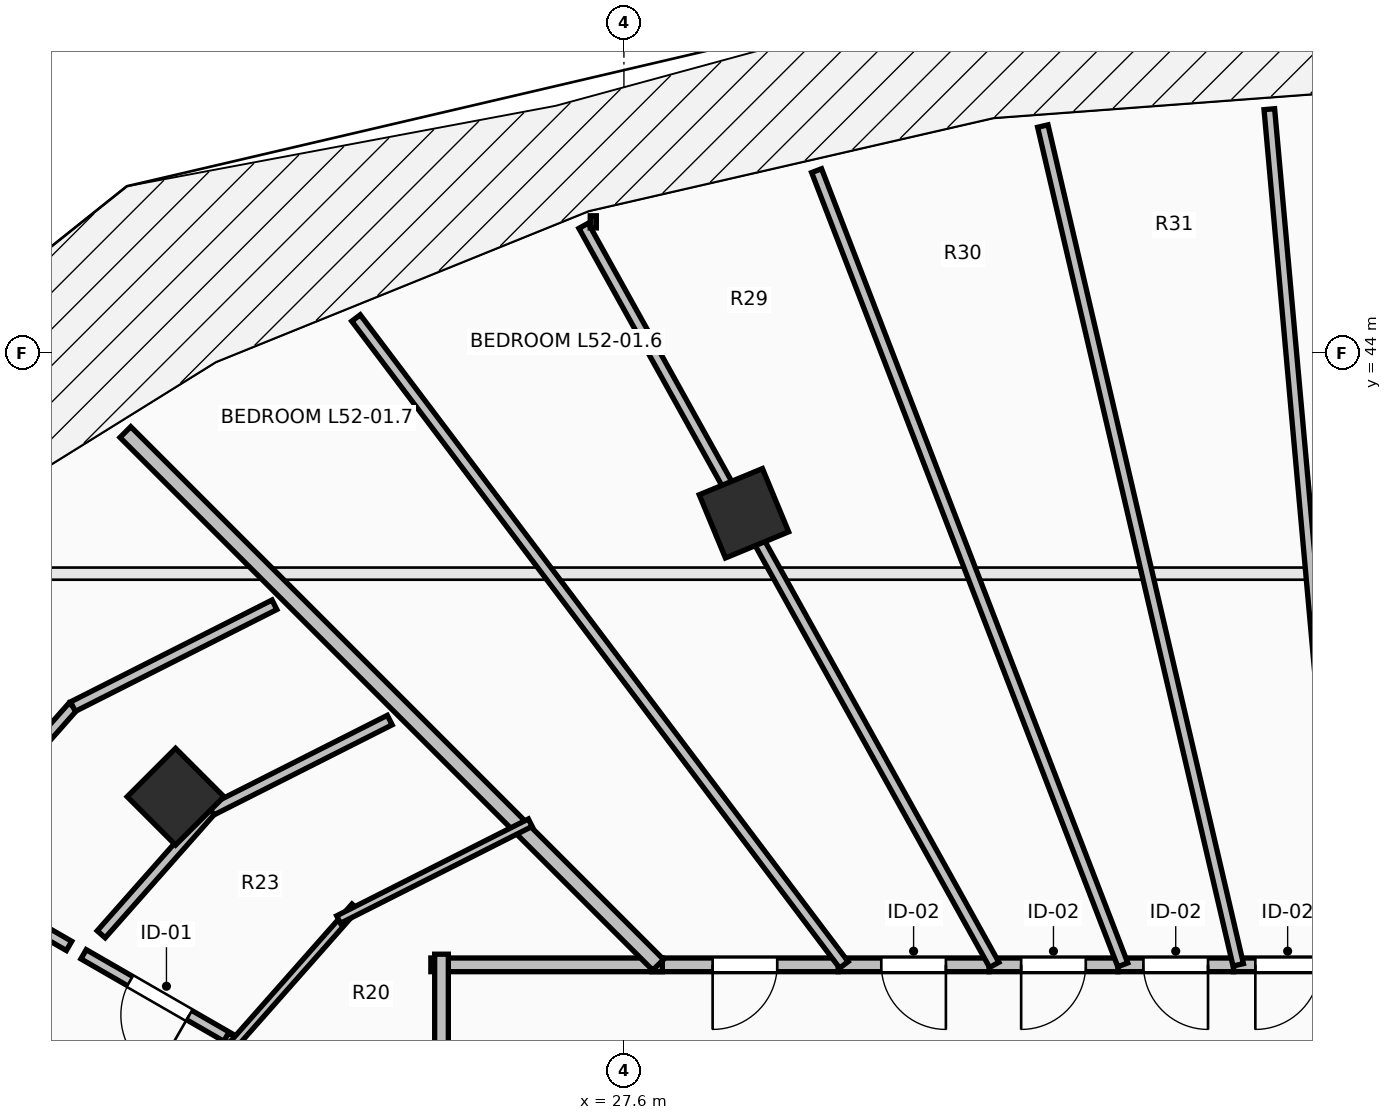
"""IFC4 building model, lengths in metres.
Left out: names, types, materials, properties, quantities, classifications, styles, units other than length and angle.
Written with IfcOpenShell. Run it as: python <this file> out.ifc"""

import sys

from ifc_helpers import new_model, si_unit, direction, frame, frame_2d, origin, origin_2d, place, context, subcontext, project, spatial, rectangle, extrude, element, fill, save


model = new_model("IFC4")
c1 = context("Model", 3, precision=1e-05, world=origin(), true_north=direction((0.0, 1.0)))
c2 = subcontext(c1, "Body", "Model", "MODEL_VIEW")
j1 = project(units=[si_unit("LENGTHUNIT", "METRE"), si_unit("PLANEANGLEUNIT", "RADIAN")], contexts=[c1])
p1 = place(None, origin())
s1 = spatial("IfcSite", under=j1, at=p1, CompositionType="ELEMENT")
p2 = place(p1, origin())
s2 = spatial("IfcBuilding", under=s1, at=p2, CompositionType="ELEMENT")
p3 = place(p2, frame((0.0, 0.0, 193.1)))
s3 = spatial("IfcBuildingStorey", under=s2, at=p3, CompositionType="ELEMENT", Elevation=193.1)
for number, where, z_axis, x_axis in (
    (1, (29.179, 41.891, 0.0), (0.0, 0.0, 1.0), (-0.383, 0.924, 0.0)),
    (2, (21.701, 38.162, 0.0), (0.0, 0.0, 1.0), (-0.707, 0.707, 0.0)),
):
    element("IfcColumn", number, at=place(p3, frame(where, z_axis=z_axis, x_axis=x_axis)), inside=s3, PredefinedType="COLUMN", context=c2, shape_type="SweptSolid", body=[
        extrude(rectangle(XDim=0.9, YDim=0.9, at=origin_2d()), origin(), (0.0, 0.0, 1.0), 3.5),
    ])
p4 = place(p3, frame((37.044, 35.95, 0.0), z_axis=(0.0, 0.0, 1.0), x_axis=(-1.0, 0.0, 0.0)))
e3 = element("IfcWall", 3, at=p4, inside=s3, PredefinedType="PARTITIONING", context=c2, shape_type="SweptSolid", body=[
    extrude(rectangle(XDim=1.424, YDim=0.18, at=frame_2d((0.712, 0.0))), origin(), (0.0, 0.0, 1.0), 3.24),
])
p5 = place(p4, frame((0.287, 0.0, 0.0)))
e4 = element("IfcOpeningElement", 4, at=p5, cuts=e3, PredefinedType="OPENING", context=c2, shape_type="SweptSolid", body=[
    extrude(rectangle(XDim=0.85, YDim=2.1, at=frame_2d((0.425, 1.05))), frame((0.0, 0.105, 0.0), z_axis=(0.0, -1.0, 0.0), x_axis=(1.0, 0.0, 0.0)), (0.0, 0.0, 1.0), 0.21),
])
p6 = place(p3, frame((35.62, 35.95, 0.0), z_axis=(0.0, 0.0, 1.0), x_axis=(-1.0, 0.0, 0.0)))
e5 = element("IfcWall", 5, at=p6, inside=s3, PredefinedType="PARTITIONING", context=c2, shape_type="SweptSolid", body=[
    extrude(rectangle(XDim=1.521, YDim=0.18, at=frame_2d((0.76, 0.0))), origin(), (0.0, 0.0, 1.0), 3.24),
])
p7 = place(p6, frame((0.335, 0.0, 0.0)))
e6 = element("IfcOpeningElement", 6, at=p7, cuts=e5, PredefinedType="OPENING", context=c2, shape_type="SweptSolid", body=[
    extrude(rectangle(XDim=0.85, YDim=2.1, at=frame_2d((0.425, 1.05))), frame((0.0, 0.105, 0.0), z_axis=(0.0, -1.0, 0.0), x_axis=(1.0, 0.0, 0.0)), (0.0, 0.0, 1.0), 0.21),
])
p8 = place(p3, frame((34.099, 35.95, 0.0), z_axis=(0.0, 0.0, 1.0), x_axis=(-1.0, 0.0, 0.0)))
e7 = element("IfcWall", 7, at=p8, inside=s3, PredefinedType="PARTITIONING", context=c2, shape_type="SweptSolid", body=[
    extrude(rectangle(XDim=1.696, YDim=0.18, at=frame_2d((0.848, 0.0))), origin(), (0.0, 0.0, 1.0), 3.24),
])
p9 = place(p8, frame((0.423, 0.0, 0.0)))
e8 = element("IfcOpeningElement", 8, at=p9, cuts=e7, PredefinedType="OPENING", context=c2, shape_type="SweptSolid", body=[
    extrude(rectangle(XDim=0.85, YDim=2.1, at=frame_2d((0.425, 1.05))), frame((0.0, 0.105, 0.0), z_axis=(0.0, -1.0, 0.0), x_axis=(1.0, 0.0, 0.0)), (0.0, 0.0, 1.0), 0.21),
])
p10 = place(p3, frame((32.403, 35.95, 0.0), z_axis=(0.0, 0.0, 1.0), x_axis=(-1.0, 0.0, 0.0)))
e9 = element("IfcWall", 9, at=p10, inside=s3, PredefinedType="PARTITIONING", context=c2, shape_type="SweptSolid", body=[
    extrude(rectangle(XDim=1.984, YDim=0.18, at=frame_2d((0.992, 0.0))), origin(), (0.0, 0.0, 1.0), 2.432),
])
p11 = place(p10, frame((0.567, 0.0, 0.0)))
e10 = element("IfcOpeningElement", 10, at=p11, cuts=e9, PredefinedType="OPENING", context=c2, shape_type="SweptSolid", body=[
    extrude(rectangle(XDim=0.85, YDim=2.1, at=frame_2d((0.425, 1.05))), frame((0.0, 0.105, 0.0), z_axis=(0.0, -1.0, 0.0), x_axis=(1.0, 0.0, 0.0)), (0.0, 0.0, 1.0), 0.21),
])
p12 = place(p3, frame((30.419, 35.95, 0.0), z_axis=(0.0, 0.0, 1.0), x_axis=(-1.0, 0.0, 0.0)))
e11 = element("IfcWall", 11, at=p12, inside=s3, PredefinedType="PARTITIONING", context=c2, shape_type="SweptSolid", body=[
    extrude(rectangle(XDim=2.454, YDim=0.18, at=frame_2d((1.227, 0.0))), origin(), (0.0, 0.0, 1.0), 2.432),
])
p13 = place(p12, frame((0.802, 0.0, 0.0)))
e12 = element("IfcOpeningElement", 12, at=p13, cuts=e11, PredefinedType="OPENING", context=c2, shape_type="SweptSolid", body=[
    extrude(rectangle(XDim=0.85, YDim=2.1, at=frame_2d((0.425, 1.05))), frame((0.0, 0.105, 0.0), z_axis=(0.0, -1.0, 0.0), x_axis=(1.0, 0.0, 0.0)), (0.0, 0.0, 1.0), 0.21),
])
p14 = place(p3, frame((28.105, 35.95, 0.0), z_axis=(0.0, 0.0, 1.0), x_axis=(-1.0, 0.0, 0.0)))
e13 = element("IfcWall", 13, at=p14, inside=s3, PredefinedType="PARTITIONING", context=c2, shape_type="SweptSolid", body=[
    extrude(rectangle(XDim=3.045, YDim=0.18, at=frame_2d((1.522, 0.0))), origin(), (0.0, 0.0, 1.0), 2.432),
])
p15 = place(p3, frame((25.2, 36.09, 0.0), z_axis=(0.0, 0.0, 1.0), x_axis=(0.0, -1.0, 0.0)))
e14 = element("IfcWall", 14, at=p15, inside=s3, PredefinedType="PARTITIONING", context=c2, shape_type="SweptSolid", body=[
    extrude(rectangle(XDim=2.785, YDim=0.18, at=frame_2d((1.393, 0.0))), origin(), (0.0, 0.0, 1.0), 2.432),
])
p16 = place(p3, frame((36.091, 47.207, 0.0), z_axis=(0.0, 0.0, 1.0), x_axis=(0.089620343685, -0.995976000714, 0.0)))
e15 = element("IfcWall", 15, at=p16, inside=s3, PredefinedType="PARTITIONING", context=c2, shape_type="SweptSolid", body=[
    extrude(rectangle(XDim=11.302, YDim=0.14, at=frame_2d((5.651, 0.0))), origin(), (0.0, 0.0, 1.0), 2.432),
])
p17 = place(p3, frame((33.111, 46.985, 0.0), z_axis=(0.0, 0.0, 1.0), x_axis=(0.226889028745, -0.973920617214, 0.0)))
e16 = element("IfcWall", 16, at=p17, inside=s3, PredefinedType="PARTITIONING", context=c2, shape_type="SweptSolid", body=[
    extrude(rectangle(XDim=11.331, YDim=0.14, at=frame_2d((5.665, 0.0))), origin(), (0.0, 0.0, 1.0), 2.432),
])
p18 = place(p3, frame((30.135, 46.398, 0.0), z_axis=(0.0, 0.0, 1.0), x_axis=(0.359727007777, -0.933057597298, 0.0)))
e17 = element("IfcWall", 17, at=p18, inside=s3, PredefinedType="PARTITIONING", context=c2, shape_type="SweptSolid", body=[
    extrude(rectangle(XDim=11.198, YDim=0.14, at=frame_2d((5.599, 0.0))), origin(), (0.0, 0.0, 1.0), 2.432),
])
p19 = place(p3, frame((27.069, 45.673, 0.0), z_axis=(0.0, 0.0, 1.0), x_axis=(0.485717471054, -0.874115860921, 0.0)))
e18 = element("IfcWall", 18, at=p19, inside=s3, PredefinedType="PARTITIONING", context=c2, shape_type="SweptSolid", body=[
    extrude(rectangle(XDim=11.123, YDim=0.14, at=frame_2d((5.562, 0.0))), origin(), (0.0, 0.0, 1.0), 2.432),
])
p20 = place(p3, frame((24.075, 44.46, 0.0), z_axis=(0.0, 0.0, 1.0), x_axis=(0.602185523072, -0.798356183544, 0.0)))
e19 = element("IfcWall", 19, at=p20, inside=s3, PredefinedType="PARTITIONING", context=c2, shape_type="SweptSolid", body=[
    extrude(rectangle(XDim=10.659, YDim=0.14, at=frame_2d((5.33, 0.0))), origin(), (0.0, 0.0, 1.0), 2.432),
])
p21 = place(p3, frame((21.041, 42.959, 0.0), z_axis=(0.0, 0.0, 1.0), x_axis=(0.707106781187, -0.707106781187, 0.0)))
e20 = element("IfcWall", 20, at=p21, inside=s3, PredefinedType="PARTITIONING", context=c2, shape_type="SweptSolid", body=[
    extrude(rectangle(XDim=9.912, YDim=0.2, at=frame_2d((4.956, 0.0))), origin(), (0.0, 0.0, 1.0), 2.432),
])
p22 = place(p3, frame((22.492, 34.936, 0.0), z_axis=(0.0, 0.0, 1.0), x_axis=(-0.866435390844, 0.499289208267, 0.0)))
e21 = element("IfcWall", 21, at=p22, inside=s3, PredefinedType="PARTITIONING", context=c2, shape_type="SweptSolid", body=[
    extrude(rectangle(XDim=2.309, YDim=0.14, at=frame_2d((1.155, 0.0))), origin(), (0.0, 0.0, 1.0), 2.922),
])
p23 = place(p22, frame((0.705, 0.0, 0.0)))
e22 = element("IfcOpeningElement", 22, at=p23, cuts=e21, PredefinedType="OPENING", context=c2, shape_type="SweptSolid", body=[
    extrude(rectangle(XDim=0.9, YDim=2.1, at=frame_2d((0.45, 1.05))), frame((0.0, 0.085, 0.0), z_axis=(0.0, -1.0, 0.0), x_axis=(1.0, 0.0, 0.0)), (0.0, 0.0, 1.0), 0.17),
])
p24 = place(p3, frame((25.321, 33.306, 0.0), z_axis=(0.0, 0.0, 1.0), x_axis=(-0.866517217622, 0.49914718427, 0.0)))
e23 = element("IfcWall", 23, at=p24, inside=s3, PredefinedType="PARTITIONING", context=c2, shape_type="SweptSolid", body=[
    extrude(rectangle(XDim=3.405, YDim=0.11, at=frame_2d((1.703, 0.0))), origin(), (0.0, 0.0, 1.0), 2.922),
])
p25 = place(p24, frame((1.278, 0.0, 0.0)))
e24 = element("IfcOpeningElement", 24, at=p25, cuts=e23, PredefinedType="OPENING", context=c2, shape_type="SweptSolid", body=[
    extrude(rectangle(XDim=0.85, YDim=2.1, at=frame_2d((0.425, 1.05))), frame((0.0, 0.07, 0.0), z_axis=(0.0, -1.0, 0.0), x_axis=(1.0, 0.0, 0.0)), (0.0, 0.0, 1.0), 0.14),
])
p26 = place(p3, frame((22.399, 34.831, 0.0), z_axis=(0.0, 0.0, 1.0), x_axis=(0.662292938072, 0.749244996099, 0.0)))
e25 = element("IfcWall", 25, at=p26, inside=s3, PredefinedType="PARTITIONING", context=c2, shape_type="SweptSolid", body=[
    extrude(rectangle(XDim=2.513, YDim=0.11, at=frame_2d((1.256, 0.0))), origin(), (0.0, 0.0, 1.0), 2.432),
])
p27 = place(p3, frame((23.846, 36.546, 0.0), z_axis=(0.0, 0.0, 1.0), x_axis=(0.892553076465, 0.450942352959, 0.0)))
e26 = element("IfcWall", 26, at=p27, inside=s3, PredefinedType="PARTITIONING", context=c2, shape_type="SweptSolid", body=[
    extrude(rectangle(XDim=2.826, YDim=0.11, at=frame_2d((1.413, 0.0))), origin(), (0.0, 0.0, 1.0), 2.432),
])
p28 = place(p3, frame((18.49, 37.242, 0.0), z_axis=(0.0, 0.0, 1.0), x_axis=(0.662371376331, 0.749175653513, 0.0)))
e27 = element("IfcWall", 27, at=p28, inside=s3, PredefinedType="PARTITIONING", context=c2, shape_type="SweptSolid", body=[
    extrude(rectangle(XDim=2.81, YDim=0.14, at=frame_2d((1.405, 0.0))), origin(), (0.0, 0.0, 1.0), 3.24),
])
p29 = place(p3, frame((20.351, 39.347, 0.0), z_axis=(0.0, 0.0, 1.0), x_axis=(0.89244587056, 0.451154483653, 0.0)))
e28 = element("IfcWall", 28, at=p29, inside=s3, PredefinedType="PARTITIONING", context=c2, shape_type="SweptSolid", body=[
    extrude(rectangle(XDim=2.97, YDim=0.14, at=frame_2d((1.485, 0.0))), origin(), (0.0, 0.0, 1.0), 3.24),
])
p30 = place(p3, frame((20.3, 36.199, 0.0), z_axis=(0.0, 0.0, 1.0), x_axis=(-0.86645395742, 0.499256987604, 0.0)))
e29 = element("IfcWall", 29, at=p30, inside=s3, PredefinedType="PARTITIONING", context=c2, shape_type="SweptSolid", body=[
    extrude(rectangle(XDim=2.089, YDim=0.14, at=frame_2d((1.044, 0.0))), origin(), (0.0, 0.0, 1.0), 2.774),
])
p31 = place(p3, frame((24.519, 39.17, 0.0), z_axis=(0.0, 0.0, 1.0), x_axis=(-0.89247840077, -0.451090128643, 0.0)))
e30 = element("IfcWall", 30, at=p31, inside=s3, PredefinedType="PARTITIONING", context=c2, shape_type="SweptSolid", body=[
    extrude(rectangle(XDim=2.642, YDim=0.14, at=frame_2d((1.321, 0.0))), origin(), (0.0, 0.0, 1.0), 2.432),
])
p32 = place(p3, frame((22.161, 37.978, 0.0), z_axis=(0.0, 0.0, 1.0), x_axis=(-0.662476802918, -0.749082429106, 0.0)))
e31 = element("IfcWall", 31, at=p32, inside=s3, PredefinedType="PARTITIONING", context=c2, shape_type="SweptSolid", body=[
    extrude(rectangle(XDim=2.171, YDim=0.14, at=frame_2d((1.085, 0.0))), origin(), (0.0, 0.0, 1.0), 2.432),
])
p33 = place(p23, origin())
e32 = element("IfcDoor", 32, at=p33, inside=s3, OperationType="SINGLE_SWING_LEFT", PredefinedType="DOOR", context=c2, shape_type="SweptSolid", body=[
    extrude(rectangle(XDim=0.9, YDim=2.1, at=frame_2d((0.45, 1.05))), frame((0.0, 0.025, 0.0), z_axis=(0.0, -1.0, 0.0), x_axis=(1.0, 0.0, 0.0)), (0.0, 0.0, 1.0), 0.05),
])
fill(e22, e32)
p34 = place(p5, origin())
e33 = element("IfcDoor", 33, at=p34, inside=s3, OperationType="SINGLE_SWING_RIGHT", PredefinedType="DOOR", context=c2, shape_type="SweptSolid", body=[
    extrude(rectangle(XDim=0.85, YDim=2.1, at=frame_2d((0.425, 1.05))), frame((0.0, 0.025, 0.0), z_axis=(0.0, -1.0, 0.0), x_axis=(1.0, 0.0, 0.0)), (0.0, 0.0, 1.0), 0.05),
])
fill(e4, e33)
p35 = place(p7, origin())
e34 = element("IfcDoor", 34, at=p35, inside=s3, OperationType="SINGLE_SWING_LEFT", PredefinedType="DOOR", context=c2, shape_type="SweptSolid", body=[
    extrude(rectangle(XDim=0.85, YDim=2.1, at=frame_2d((0.425, 1.05))), frame((0.0, 0.025, 0.0), z_axis=(0.0, -1.0, 0.0), x_axis=(1.0, 0.0, 0.0)), (0.0, 0.0, 1.0), 0.05),
])
fill(e6, e34)
p36 = place(p9, origin())
e35 = element("IfcDoor", 35, at=p36, inside=s3, OperationType="SINGLE_SWING_RIGHT", PredefinedType="DOOR", context=c2, shape_type="SweptSolid", body=[
    extrude(rectangle(XDim=0.85, YDim=2.1, at=frame_2d((0.425, 1.05))), frame((0.0, 0.025, 0.0), z_axis=(0.0, -1.0, 0.0), x_axis=(1.0, 0.0, 0.0)), (0.0, 0.0, 1.0), 0.05),
])
fill(e8, e35)
p37 = place(p11, origin())
e36 = element("IfcDoor", 36, at=p37, inside=s3, OperationType="SINGLE_SWING_LEFT", PredefinedType="DOOR", context=c2, shape_type="SweptSolid", body=[
    extrude(rectangle(XDim=0.85, YDim=2.1, at=frame_2d((0.425, 1.05))), frame((0.0, 0.025, 0.0), z_axis=(0.0, -1.0, 0.0), x_axis=(1.0, 0.0, 0.0)), (0.0, 0.0, 1.0), 0.05),
])
fill(e10, e36)
p38 = place(p13, origin())
e37 = element("IfcDoor", 37, at=p38, inside=s3, OperationType="SINGLE_SWING_RIGHT", PredefinedType="DOOR", context=c2, shape_type="SweptSolid", body=[
    extrude(rectangle(XDim=0.85, YDim=2.1, at=frame_2d((0.425, 1.05))), frame((0.0, 0.025, 0.0), z_axis=(0.0, -1.0, 0.0), x_axis=(1.0, 0.0, 0.0)), (0.0, 0.0, 1.0), 0.05),
])
fill(e12, e37)
save(model, sys.argv[1])
